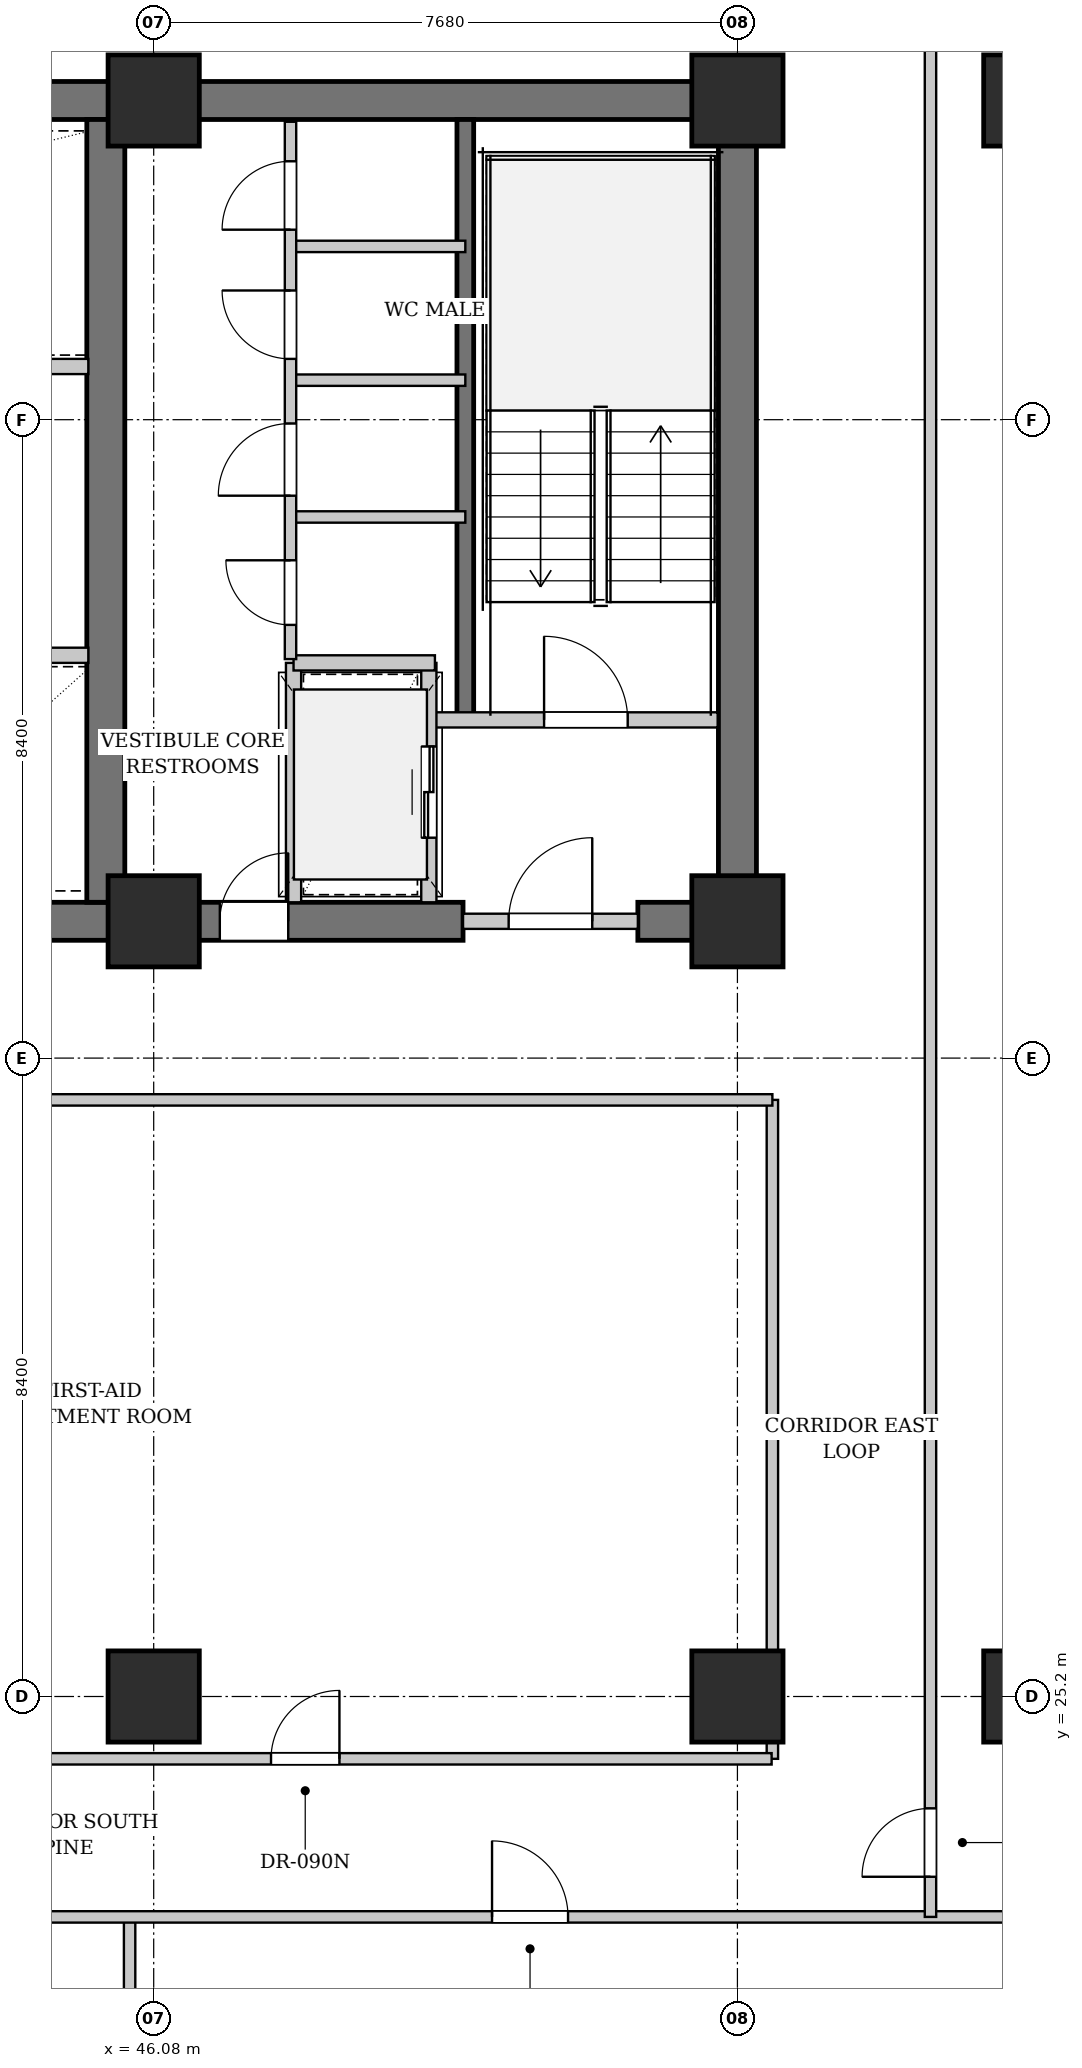
"""IFC4 building model, lengths in metres.
Left out: names, types, materials, properties, quantities, classifications, styles, units other than length and angle.
Written with IfcOpenShell. Run it as: python <this file> out.ifc"""

import sys

from ifc_helpers import new_model, si_unit, direction, frame, frame_2d, origin, origin_2d, place, context, subcontext, project, spatial, rectangle, extrude, element, fill, save


model = new_model("IFC4")
c1 = context("Model", 3, precision=1e-05, world=origin(), true_north=direction((0.0, 1.0)))
c2 = subcontext(c1, "Body", "Model", "MODEL_VIEW")
j1 = project(units=[si_unit("LENGTHUNIT", "METRE"), si_unit("PLANEANGLEUNIT", "RADIAN")], contexts=[c1])
p1 = place(None, origin())
s1 = spatial("IfcSite", under=j1, at=p1, CompositionType="ELEMENT")
p2 = place(p1, origin())
s2 = spatial("IfcBuilding", under=s1, at=p2, CompositionType="ELEMENT")
p3 = place(p2, frame((0.0, 0.0, 47.4)))
s3 = spatial("IfcBuildingStorey", under=s2, at=p3, CompositionType="ELEMENT", Elevation=47.4)
p4 = place(p3, frame((22.79, 46.2, 0.0), z_axis=(0.0, 0.0, 1.0), x_axis=(1.0, 0.0, 0.0)))
e1 = element("IfcWall", 1, at=p4, inside=s3, PredefinedType="SHEAR", context=c2, shape_type="SweptSolid", body=[
    extrude(rectangle(XDim=31.22, YDim=0.5, at=frame_2d((15.61, 0.0))), origin(), (0.0, 0.0, 1.0), 3.18),
])
p5 = place(p3, frame((42.1, 35.4, 0.0), z_axis=(0.0, 0.0, 1.0), x_axis=(1.0, 0.0, 0.0)))
e2 = element("IfcWall", 2, at=p5, inside=s3, PredefinedType="SHEAR", context=c2, shape_type="SweptSolid", body=[
    extrude(rectangle(XDim=8.05, YDim=0.5, at=frame_2d((4.025, 0.0))), origin(), (0.0, 0.0, 1.0), 3.18),
])
p6 = place(p5, frame((4.85, 0.0, 0.0)))
e3 = element("IfcOpeningElement", 3, at=p6, cuts=e2, PredefinedType="OPENING", context=c2, shape_type="SweptSolid", body=[
    extrude(rectangle(XDim=0.9, YDim=2.15, at=frame_2d((0.45, 1.075))), frame((0.0, 0.26, 0.0), z_axis=(0.0, -1.0, 0.0), x_axis=(1.0, 0.0, 0.0)), (0.0, 0.0, 1.0), 0.52),
])
p7 = place(p3, frame((52.45, 35.4, 0.0), z_axis=(0.0, 0.0, 1.0), x_axis=(1.0, 0.0, 0.0)))
e4 = element("IfcWall", 4, at=p7, inside=s3, PredefinedType="SHEAR", context=c2, shape_type="SweptSolid", body=[
    extrude(rectangle(XDim=1.56, YDim=0.5, at=frame_2d((0.78, 0.0))), origin(), (0.0, 0.0, 1.0), 3.18),
])
for number, where, z_axis, x_axis in (
    (5, (45.45, 35.65, 0.0), (0.0, 0.0, 1.0), (0.0, 1.0, 0.0)),
    (6, (53.76, 35.65, 0.0), (0.0, 0.0, 1.0), (0.0, 1.0, 0.0)),
):
    element("IfcWall", number, at=place(p3, frame(where, z_axis=z_axis, x_axis=x_axis)), inside=s3, PredefinedType="SHEAR", context=c2, shape_type="SweptSolid", body=[
        extrude(rectangle(XDim=10.3, YDim=0.5, at=frame_2d((5.15, 0.0))), origin(), (0.0, 0.0, 1.0), 3.18),
    ])
p8 = place(p3, frame((50.18, 38.05, 0.0), z_axis=(0.0, 0.0, 1.0), x_axis=(0.0, 1.0, 0.0)))
e7 = element("IfcWall", 7, at=p8, inside=s3, PredefinedType="SHEAR", context=c2, shape_type="SweptSolid", body=[
    extrude(rectangle(XDim=7.9, YDim=0.22, at=frame_2d((3.95, 0.0))), origin(), (0.0, 0.0, 1.0), 3.18),
])
for number, where, z_axis, x_axis in (
    (8, (46.08, 35.4, 0.0), (0.0, 0.0, 1.0), (1.0, 0.0, 0.0)),
    (9, (46.08, 46.2, 0.0), (0.0, 0.0, 1.0), (1.0, 0.0, 0.0)),
    (10, (46.08, 25.2, 0.0), (0.0, 0.0, 1.0), (1.0, 0.0, 0.0)),
    (11, (53.76, 35.4, 0.0), (0.0, 0.0, 1.0), (1.0, 0.0, 0.0)),
    (12, (53.76, 46.2, 0.0), (0.0, 0.0, 1.0), (1.0, 0.0, 0.0)),
    (13, (53.76, 25.2, 0.0), (0.0, 0.0, 1.0), (1.0, 0.0, 0.0)),
    (14, (57.6, 25.2, 0.0), (0.0, 0.0, 1.0), (1.0, 0.0, 0.0)),
    (15, (57.6, 46.2, 0.0), (0.0, 0.0, 1.0), (1.0, 0.0, 0.0)),
):
    element("IfcColumn", number, at=place(p3, frame(where, z_axis=z_axis, x_axis=x_axis)), inside=s3, PredefinedType="COLUMN", context=c2, shape_type="SweptSolid", body=[
        extrude(rectangle(XDim=1.2, YDim=1.2, at=origin_2d()), origin(), (0.0, 0.0, 1.0), 3.4),
    ])
for number, where, z_axis, x_axis in (
    (16, (41.85, 38.9, 0.0), (0.0, 0.0, 1.0), (1.0, 0.0, 0.0)),
    (17, (41.85, 42.7, 0.0), (0.0, 0.0, 1.0), (1.0, 0.0, 0.0)),
):
    element("IfcWall", number, at=place(p3, frame(where, z_axis=z_axis, x_axis=x_axis)), inside=s3, PredefinedType="PARTITIONING", context=c2, shape_type="SweptSolid", body=[
        extrude(rectangle(XDim=3.37, YDim=0.2, at=frame_2d((1.685, 0.0))), origin(), (0.0, 0.0, 1.0), 3.18),
    ])
p9 = place(p3, frame((49.78, 38.05, 0.0), z_axis=(0.0, 0.0, 1.0), x_axis=(1.0, 0.0, 0.0)))
e18 = element("IfcWall", 18, at=p9, inside=s3, PredefinedType="PARTITIONING", context=c2, shape_type="SweptSolid", body=[
    extrude(rectangle(XDim=3.72, YDim=0.2, at=frame_2d((1.86, 0.0))), origin(), (0.0, 0.0, 1.0), 3.18),
])
p10 = place(p9, frame((1.436, 0.0, 0.0)))
e19 = element("IfcOpeningElement", 19, at=p10, cuts=e18, PredefinedType="OPENING", context=c2, shape_type="SweptSolid", body=[
    extrude(rectangle(XDim=1.1, YDim=2.15, at=frame_2d((0.55, 1.075))), frame((0.0, 0.11, 0.0), z_axis=(0.0, -1.0, 0.0), x_axis=(1.0, 0.0, 0.0)), (0.0, 0.0, 1.0), 0.22),
])
p11 = place(p3, frame((50.15, 35.4, 0.0), z_axis=(0.0, 0.0, 1.0), x_axis=(1.0, 0.0, 0.0)))
e20 = element("IfcWall", 20, at=p11, inside=s3, PredefinedType="PARTITIONING", context=c2, shape_type="SweptSolid", body=[
    extrude(rectangle(XDim=2.3, YDim=0.2, at=frame_2d((1.15, 0.0))), origin(), (0.0, 0.0, 1.0), 2.475),
])
p12 = place(p11, frame((0.6, 0.0, 0.0)))
e21 = element("IfcOpeningElement", 21, at=p12, cuts=e20, PredefinedType="OPENING", context=c2, shape_type="SweptSolid", body=[
    extrude(rectangle(XDim=1.1, YDim=2.15, at=frame_2d((0.55, 1.075))), frame((0.0, 0.11, 0.0), z_axis=(0.0, -1.0, 0.0), x_axis=(1.0, 0.0, 0.0)), (0.0, 0.0, 1.0), 0.22),
])
p13 = place(p3, frame((49.7, 35.65, 0.0), z_axis=(0.0, 0.0, 1.0), x_axis=(0.0, 1.0, 0.0)))
e22 = element("IfcWall", 22, at=p13, inside=s3, PredefinedType="PARTITIONING", context=c2, shape_type="SweptSolid", body=[
    extrude(rectangle(XDim=3.15, YDim=0.2, at=frame_2d((1.575, 0.0))), origin(), (0.0, 0.0, 1.0), 3.18),
])
p14 = place(p13, frame((0.85, 0.0, 0.0)))
e23 = element("IfcOpeningElement", 23, at=p14, cuts=e22, PredefinedType="OPENING", context=c2, shape_type="SweptSolid", body=[
    extrude(rectangle(XDim=1.2, YDim=2.2, at=frame_2d((0.6, 1.1))), frame((0.0, 0.11, 0.0), z_axis=(0.0, -1.0, 0.0), x_axis=(1.0, 0.0, 0.0)), (0.0, 0.0, 1.0), 0.22),
])
p15 = place(p3, frame((47.92, 35.65, 0.0), z_axis=(0.0, 0.0, 1.0), x_axis=(0.0, 1.0, 0.0)))
e24 = element("IfcWall", 24, at=p15, inside=s3, PredefinedType="PARTITIONING", context=c2, shape_type="SweptSolid", body=[
    extrude(rectangle(XDim=3.15, YDim=0.2, at=frame_2d((1.575, 0.0))), origin(), (0.0, 0.0, 1.0), 3.18),
])
p16 = place(p3, frame((47.92, 38.8, 0.0), z_axis=(0.0, 0.0, 1.0), x_axis=(1.0, 0.0, 0.0)))
e25 = element("IfcWall", 25, at=p16, inside=s3, PredefinedType="PARTITIONING", context=c2, shape_type="SweptSolid", body=[
    extrude(rectangle(XDim=1.86, YDim=0.2, at=frame_2d((0.93, 0.0))), origin(), (0.0, 0.0, 1.0), 3.18),
])
for number, where, z_axis, x_axis in (
    (26, (47.88, 40.72, 0.0), (0.0, 0.0, 1.0), (1.0, 0.0, 0.0)),
    (27, (47.88, 42.52, 0.0), (0.0, 0.0, 1.0), (1.0, 0.0, 0.0)),
    (28, (47.88, 44.28, 0.0), (0.0, 0.0, 1.0), (1.0, 0.0, 0.0)),
):
    element("IfcWall", number, at=place(p3, frame(where, z_axis=z_axis, x_axis=x_axis)), inside=s3, PredefinedType="PARTITIONING", context=c2, shape_type="SweptSolid", body=[
        extrude(rectangle(XDim=2.3, YDim=0.15, at=frame_2d((1.15, 0.0))), origin(), (0.0, 0.0, 1.0), 3.18),
    ])
p17 = place(p3, frame((47.88, 38.85, 0.0), z_axis=(0.0, 0.0, 1.0), x_axis=(0.0, 1.0, 0.0)))
e29 = element("IfcWall", 29, at=p17, inside=s3, PredefinedType="PARTITIONING", context=c2, shape_type="SweptSolid", body=[
    extrude(rectangle(XDim=7.07, YDim=0.15, at=frame_2d((3.535, 0.0))), origin(), (0.0, 0.0, 1.0), 3.18),
])
p18 = place(p17, frame((0.45, 0.0, 0.0)))
e30 = element("IfcOpeningElement", 30, at=p18, cuts=e29, PredefinedType="OPENING", context=c2, shape_type="SweptSolid", body=[
    extrude(rectangle(XDim=0.85, YDim=2.15, at=frame_2d((0.425, 1.075))), frame((0.0, 0.085, 0.0), z_axis=(0.0, -1.0, 0.0), x_axis=(1.0, 0.0, 0.0)), (0.0, 0.0, 1.0), 0.17),
])
p19 = place(p17, frame((2.15, 0.0, 0.0)))
e31 = element("IfcOpeningElement", 31, at=p19, cuts=e29, PredefinedType="OPENING", context=c2, shape_type="SweptSolid", body=[
    extrude(rectangle(XDim=0.95, YDim=2.15, at=frame_2d((0.475, 1.075))), frame((0.0, 0.085, 0.0), z_axis=(0.0, -1.0, 0.0), x_axis=(1.0, 0.0, 0.0)), (0.0, 0.0, 1.0), 0.17),
])
p20 = place(p17, frame((3.95, 0.0, 0.0)))
e32 = element("IfcOpeningElement", 32, at=p20, cuts=e29, PredefinedType="OPENING", context=c2, shape_type="SweptSolid", body=[
    extrude(rectangle(XDim=0.9, YDim=2.15, at=frame_2d((0.45, 1.075))), frame((0.0, 0.085, 0.0), z_axis=(0.0, -1.0, 0.0), x_axis=(1.0, 0.0, 0.0)), (0.0, 0.0, 1.0), 0.17),
])
p21 = place(p17, frame((5.65, 0.0, 0.0)))
e33 = element("IfcOpeningElement", 33, at=p21, cuts=e29, PredefinedType="OPENING", context=c2, shape_type="SweptSolid", body=[
    extrude(rectangle(XDim=0.9, YDim=2.15, at=frame_2d((0.45, 1.075))), frame((0.0, 0.085, 0.0), z_axis=(0.0, -1.0, 0.0), x_axis=(1.0, 0.0, 0.0)), (0.0, 0.0, 1.0), 0.17),
])
p22 = place(p3, frame((45.763, 10.28, 0.0), z_axis=(0.0, 0.0, 1.0), x_axis=(0.0, 1.0, 0.0)))
e34 = element("IfcWall", 34, at=p22, inside=s3, PredefinedType="PARTITIONING", context=c2, shape_type="SweptSolid", body=[
    extrude(rectangle(XDim=12.04, YDim=0.15, at=frame_2d((6.02, 0.0))), origin(), (0.0, 0.0, 1.0), 2.475),
])
p23 = place(p3, frame((6.08, 22.3, 0.0), z_axis=(0.0, 0.0, 1.0), x_axis=(1.0, 0.0, 0.0)))
e35 = element("IfcWall", 35, at=p23, inside=s3, PredefinedType="PARTITIONING", context=c2, shape_type="SweptSolid", body=[
    extrude(rectangle(XDim=64.64, YDim=0.15, at=frame_2d((32.32, 0.0))), origin(), (0.0, 0.0, 1.0), 3.18),
])
p24 = place(p23, frame((19.214, 0.0, 0.0)))
e36 = element("IfcOpeningElement", 36, at=p24, cuts=e35, PredefinedType="OPENING", context=c2, shape_type="SweptSolid", body=[
    extrude(rectangle(XDim=1.0, YDim=2.15, at=frame_2d((0.5, 1.075))), frame((0.0, 0.085, 0.0), z_axis=(0.0, -1.0, 0.0), x_axis=(1.0, 0.0, 0.0)), (0.0, 0.0, 1.0), 0.17),
])
p25 = place(p23, frame((28.139, 0.0, 0.0)))
e37 = element("IfcOpeningElement", 37, at=p25, cuts=e35, PredefinedType="OPENING", context=c2, shape_type="SweptSolid", body=[
    extrude(rectangle(XDim=1.0, YDim=2.15, at=frame_2d((0.5, 1.075))), frame((0.0, 0.085, 0.0), z_axis=(0.0, -1.0, 0.0), x_axis=(1.0, 0.0, 0.0)), (0.0, 0.0, 1.0), 0.17),
])
p26 = place(p23, frame((35.501, 0.0, 0.0)))
e38 = element("IfcOpeningElement", 38, at=p26, cuts=e35, PredefinedType="OPENING", context=c2, shape_type="SweptSolid", body=[
    extrude(rectangle(XDim=1.0, YDim=2.15, at=frame_2d((0.5, 1.075))), frame((0.0, 0.085, 0.0), z_axis=(0.0, -1.0, 0.0), x_axis=(1.0, 0.0, 0.0)), (0.0, 0.0, 1.0), 0.17),
])
p27 = place(p23, frame((44.451, 0.0, 0.0)))
e39 = element("IfcOpeningElement", 39, at=p27, cuts=e35, PredefinedType="OPENING", context=c2, shape_type="SweptSolid", body=[
    extrude(rectangle(XDim=1.0, YDim=2.15, at=frame_2d((0.5, 1.075))), frame((0.0, 0.085, 0.0), z_axis=(0.0, -1.0, 0.0), x_axis=(1.0, 0.0, 0.0)), (0.0, 0.0, 1.0), 0.17),
])
p28 = place(p3, frame((56.3, 22.3, 0.0), z_axis=(0.0, 0.0, 1.0), x_axis=(0.0, 1.0, 0.0)))
e40 = element("IfcWall", 40, at=p28, inside=s3, PredefinedType="PARTITIONING", context=c2, shape_type="SweptSolid", body=[
    extrude(rectangle(XDim=26.22, YDim=0.15, at=frame_2d((13.11, 0.0))), origin(), (0.0, 0.0, 1.0), 3.18),
])
p29 = place(p28, frame((0.528, 0.0, 0.0)))
e41 = element("IfcOpeningElement", 41, at=p29, cuts=e40, PredefinedType="OPENING", context=c2, shape_type="SweptSolid", body=[
    extrude(rectangle(XDim=0.9, YDim=2.15, at=frame_2d((0.45, 1.075))), frame((0.0, 0.085, 0.0), z_axis=(0.0, -1.0, 0.0), x_axis=(1.0, 0.0, 0.0)), (0.0, 0.0, 1.0), 0.17),
])
p30 = place(p3, frame((54.22, 24.38, 0.0), z_axis=(0.0, 0.0, 1.0), x_axis=(0.0, 1.0, 0.0)))
e42 = element("IfcWall", 42, at=p30, inside=s3, PredefinedType="PARTITIONING", context=c2, shape_type="SweptSolid", body=[
    extrude(rectangle(XDim=8.67, YDim=0.15, at=frame_2d((4.335, 0.0))), origin(), (0.0, 0.0, 1.0), 3.18),
])
p31 = place(p3, frame((22.63, 33.05, 0.0), z_axis=(0.0, 0.0, 1.0), x_axis=(1.0, 0.0, 0.0)))
e43 = element("IfcWall", 43, at=p31, inside=s3, PredefinedType="PARTITIONING", context=c2, shape_type="SweptSolid", body=[
    extrude(rectangle(XDim=31.59, YDim=0.15, at=frame_2d((15.795, 0.0))), origin(), (0.0, 0.0, 1.0), 3.18),
])
p32 = place(p3, frame((22.64, 24.38, 0.0), z_axis=(0.0, 0.0, 1.0), x_axis=(1.0, 0.0, 0.0)))
e44 = element("IfcWall", 44, at=p32, inside=s3, PredefinedType="PARTITIONING", context=c2, shape_type="SweptSolid", body=[
    extrude(rectangle(XDim=31.57, YDim=0.15, at=frame_2d((15.785, 0.0))), origin(), (0.0, 0.0, 1.0), 3.18),
])
p33 = place(p32, frame((3.18, 0.0, 0.0)))
e45 = element("IfcOpeningElement", 45, at=p33, cuts=e44, PredefinedType="OPENING", context=c2, shape_type="SweptSolid", body=[
    extrude(rectangle(XDim=0.9, YDim=2.15, at=frame_2d((0.45, 1.075))), frame((0.0, 0.085, 0.0), z_axis=(0.0, -1.0, 0.0), x_axis=(1.0, 0.0, 0.0)), (0.0, 0.0, 1.0), 0.17),
])
p34 = place(p32, frame((12.493, 0.0, 0.0)))
e46 = element("IfcOpeningElement", 46, at=p34, cuts=e44, PredefinedType="OPENING", context=c2, shape_type="SweptSolid", body=[
    extrude(rectangle(XDim=0.9, YDim=2.15, at=frame_2d((0.45, 1.075))), frame((0.0, 0.085, 0.0), z_axis=(0.0, -1.0, 0.0), x_axis=(1.0, 0.0, 0.0)), (0.0, 0.0, 1.0), 0.17),
])
p35 = place(p32, frame((24.984, 0.0, 0.0)))
e47 = element("IfcOpeningElement", 47, at=p35, cuts=e44, PredefinedType="OPENING", context=c2, shape_type="SweptSolid", body=[
    extrude(rectangle(XDim=0.9, YDim=2.15, at=frame_2d((0.45, 1.075))), frame((0.0, 0.085, 0.0), z_axis=(0.0, -1.0, 0.0), x_axis=(1.0, 0.0, 0.0)), (0.0, 0.0, 1.0), 0.17),
])
p36 = place(p10, origin())
e48 = element("IfcDoor", 48, at=p36, inside=s3, OperationType="SINGLE_SWING_LEFT", PredefinedType="DOOR", context=c2, shape_type="SweptSolid", body=[
    extrude(rectangle(XDim=1.1, YDim=2.15, at=frame_2d((0.55, 1.075))), frame((0.0, 0.025, 0.0), z_axis=(0.0, -1.0, 0.0), x_axis=(1.0, 0.0, 0.0)), (0.0, 0.0, 1.0), 0.05),
])
fill(e19, e48)
p37 = place(p12, origin())
e49 = element("IfcDoor", 49, at=p37, inside=s3, OperationType="SINGLE_SWING_RIGHT", PredefinedType="DOOR", context=c2, shape_type="SweptSolid", body=[
    extrude(rectangle(XDim=1.1, YDim=2.15, at=frame_2d((0.55, 1.075))), frame((0.0, 0.025, 0.0), z_axis=(0.0, -1.0, 0.0), x_axis=(1.0, 0.0, 0.0)), (0.0, 0.0, 1.0), 0.05),
])
fill(e21, e49)
p38 = place(p14, origin())
e50 = element("IfcDoor", 50, at=p38, inside=s3, OperationType="DOUBLE_DOOR_SLIDING", PredefinedType="DOOR", context=c2, shape_type="SweptSolid", body=[
    extrude(rectangle(XDim=1.2, YDim=2.2, at=frame_2d((0.6, 1.1))), frame((0.0, 0.025, 0.0), z_axis=(0.0, -1.0, 0.0), x_axis=(1.0, 0.0, 0.0)), (0.0, 0.0, 1.0), 0.05),
])
fill(e23, e50)
p39 = place(p18, origin())
e51 = element("IfcDoor", 51, at=p39, inside=s3, OperationType="SINGLE_SWING_RIGHT", PredefinedType="DOOR", context=c2, shape_type="SweptSolid", body=[
    extrude(rectangle(XDim=0.85, YDim=2.15, at=frame_2d((0.425, 1.075))), frame((0.0, 0.025, 0.0), z_axis=(0.0, -1.0, 0.0), x_axis=(1.0, 0.0, 0.0)), (0.0, 0.0, 1.0), 0.05),
])
fill(e30, e51)
p40 = place(p19, origin())
e52 = element("IfcDoor", 52, at=p40, inside=s3, OperationType="SINGLE_SWING_LEFT", PredefinedType="DOOR", context=c2, shape_type="SweptSolid", body=[
    extrude(rectangle(XDim=0.95, YDim=2.15, at=frame_2d((0.475, 1.075))), frame((0.0, 0.025, 0.0), z_axis=(0.0, -1.0, 0.0), x_axis=(1.0, 0.0, 0.0)), (0.0, 0.0, 1.0), 0.05),
])
fill(e31, e52)
p41 = place(p20, origin())
e53 = element("IfcDoor", 53, at=p41, inside=s3, OperationType="SINGLE_SWING_RIGHT", PredefinedType="DOOR", context=c2, shape_type="SweptSolid", body=[
    extrude(rectangle(XDim=0.9, YDim=2.15, at=frame_2d((0.45, 1.075))), frame((0.0, 0.025, 0.0), z_axis=(0.0, -1.0, 0.0), x_axis=(1.0, 0.0, 0.0)), (0.0, 0.0, 1.0), 0.05),
])
fill(e32, e53)
p42 = place(p21, origin())
e54 = element("IfcDoor", 54, at=p42, inside=s3, OperationType="SINGLE_SWING_LEFT", PredefinedType="DOOR", context=c2, shape_type="SweptSolid", body=[
    extrude(rectangle(XDim=0.9, YDim=2.15, at=frame_2d((0.45, 1.075))), frame((0.0, 0.025, 0.0), z_axis=(0.0, -1.0, 0.0), x_axis=(1.0, 0.0, 0.0)), (0.0, 0.0, 1.0), 0.05),
])
fill(e33, e54)
p43 = place(p27, origin())
e55 = element("IfcDoor", 55, at=p43, inside=s3, OperationType="SINGLE_SWING_LEFT", PredefinedType="DOOR", context=c2, shape_type="SweptSolid", body=[
    extrude(rectangle(XDim=1.0, YDim=2.15, at=frame_2d((0.5, 1.075))), frame((0.0, 0.025, 0.0), z_axis=(0.0, -1.0, 0.0), x_axis=(1.0, 0.0, 0.0)), (0.0, 0.0, 1.0), 0.05),
])
fill(e39, e55)
p44 = place(p29, origin())
e56 = element("IfcDoor", 56, at=p44, inside=s3, OperationType="SINGLE_SWING_LEFT", PredefinedType="DOOR", context=c2, shape_type="SweptSolid", body=[
    extrude(rectangle(XDim=0.9, YDim=2.15, at=frame_2d((0.45, 1.075))), frame((0.0, 0.025, 0.0), z_axis=(0.0, -1.0, 0.0), x_axis=(1.0, 0.0, 0.0)), (0.0, 0.0, 1.0), 0.05),
])
fill(e41, e56)
p45 = place(p35, origin())
e57 = element("IfcDoor", 57, at=p45, inside=s3, OperationType="SINGLE_SWING_RIGHT", PredefinedType="DOOR", context=c2, shape_type="SweptSolid", body=[
    extrude(rectangle(XDim=0.9, YDim=2.15, at=frame_2d((0.45, 1.075))), frame((0.0, 0.025, 0.0), z_axis=(0.0, -1.0, 0.0), x_axis=(1.0, 0.0, 0.0)), (0.0, 0.0, 1.0), 0.05),
])
fill(e47, e57)
p46 = place(p6, origin())
e58 = element("IfcDoor", 58, at=p46, inside=s3, OperationType="SINGLE_SWING_RIGHT", PredefinedType="DOOR", context=c2, shape_type="SweptSolid", body=[
    extrude(rectangle(XDim=0.9, YDim=2.15, at=frame_2d((0.45, 1.075))), frame((0.0, 0.025, 0.0), z_axis=(0.0, -1.0, 0.0), x_axis=(1.0, 0.0, 0.0)), (0.0, 0.0, 1.0), 0.05),
])
fill(e3, e58)
save(model, sys.argv[1])
